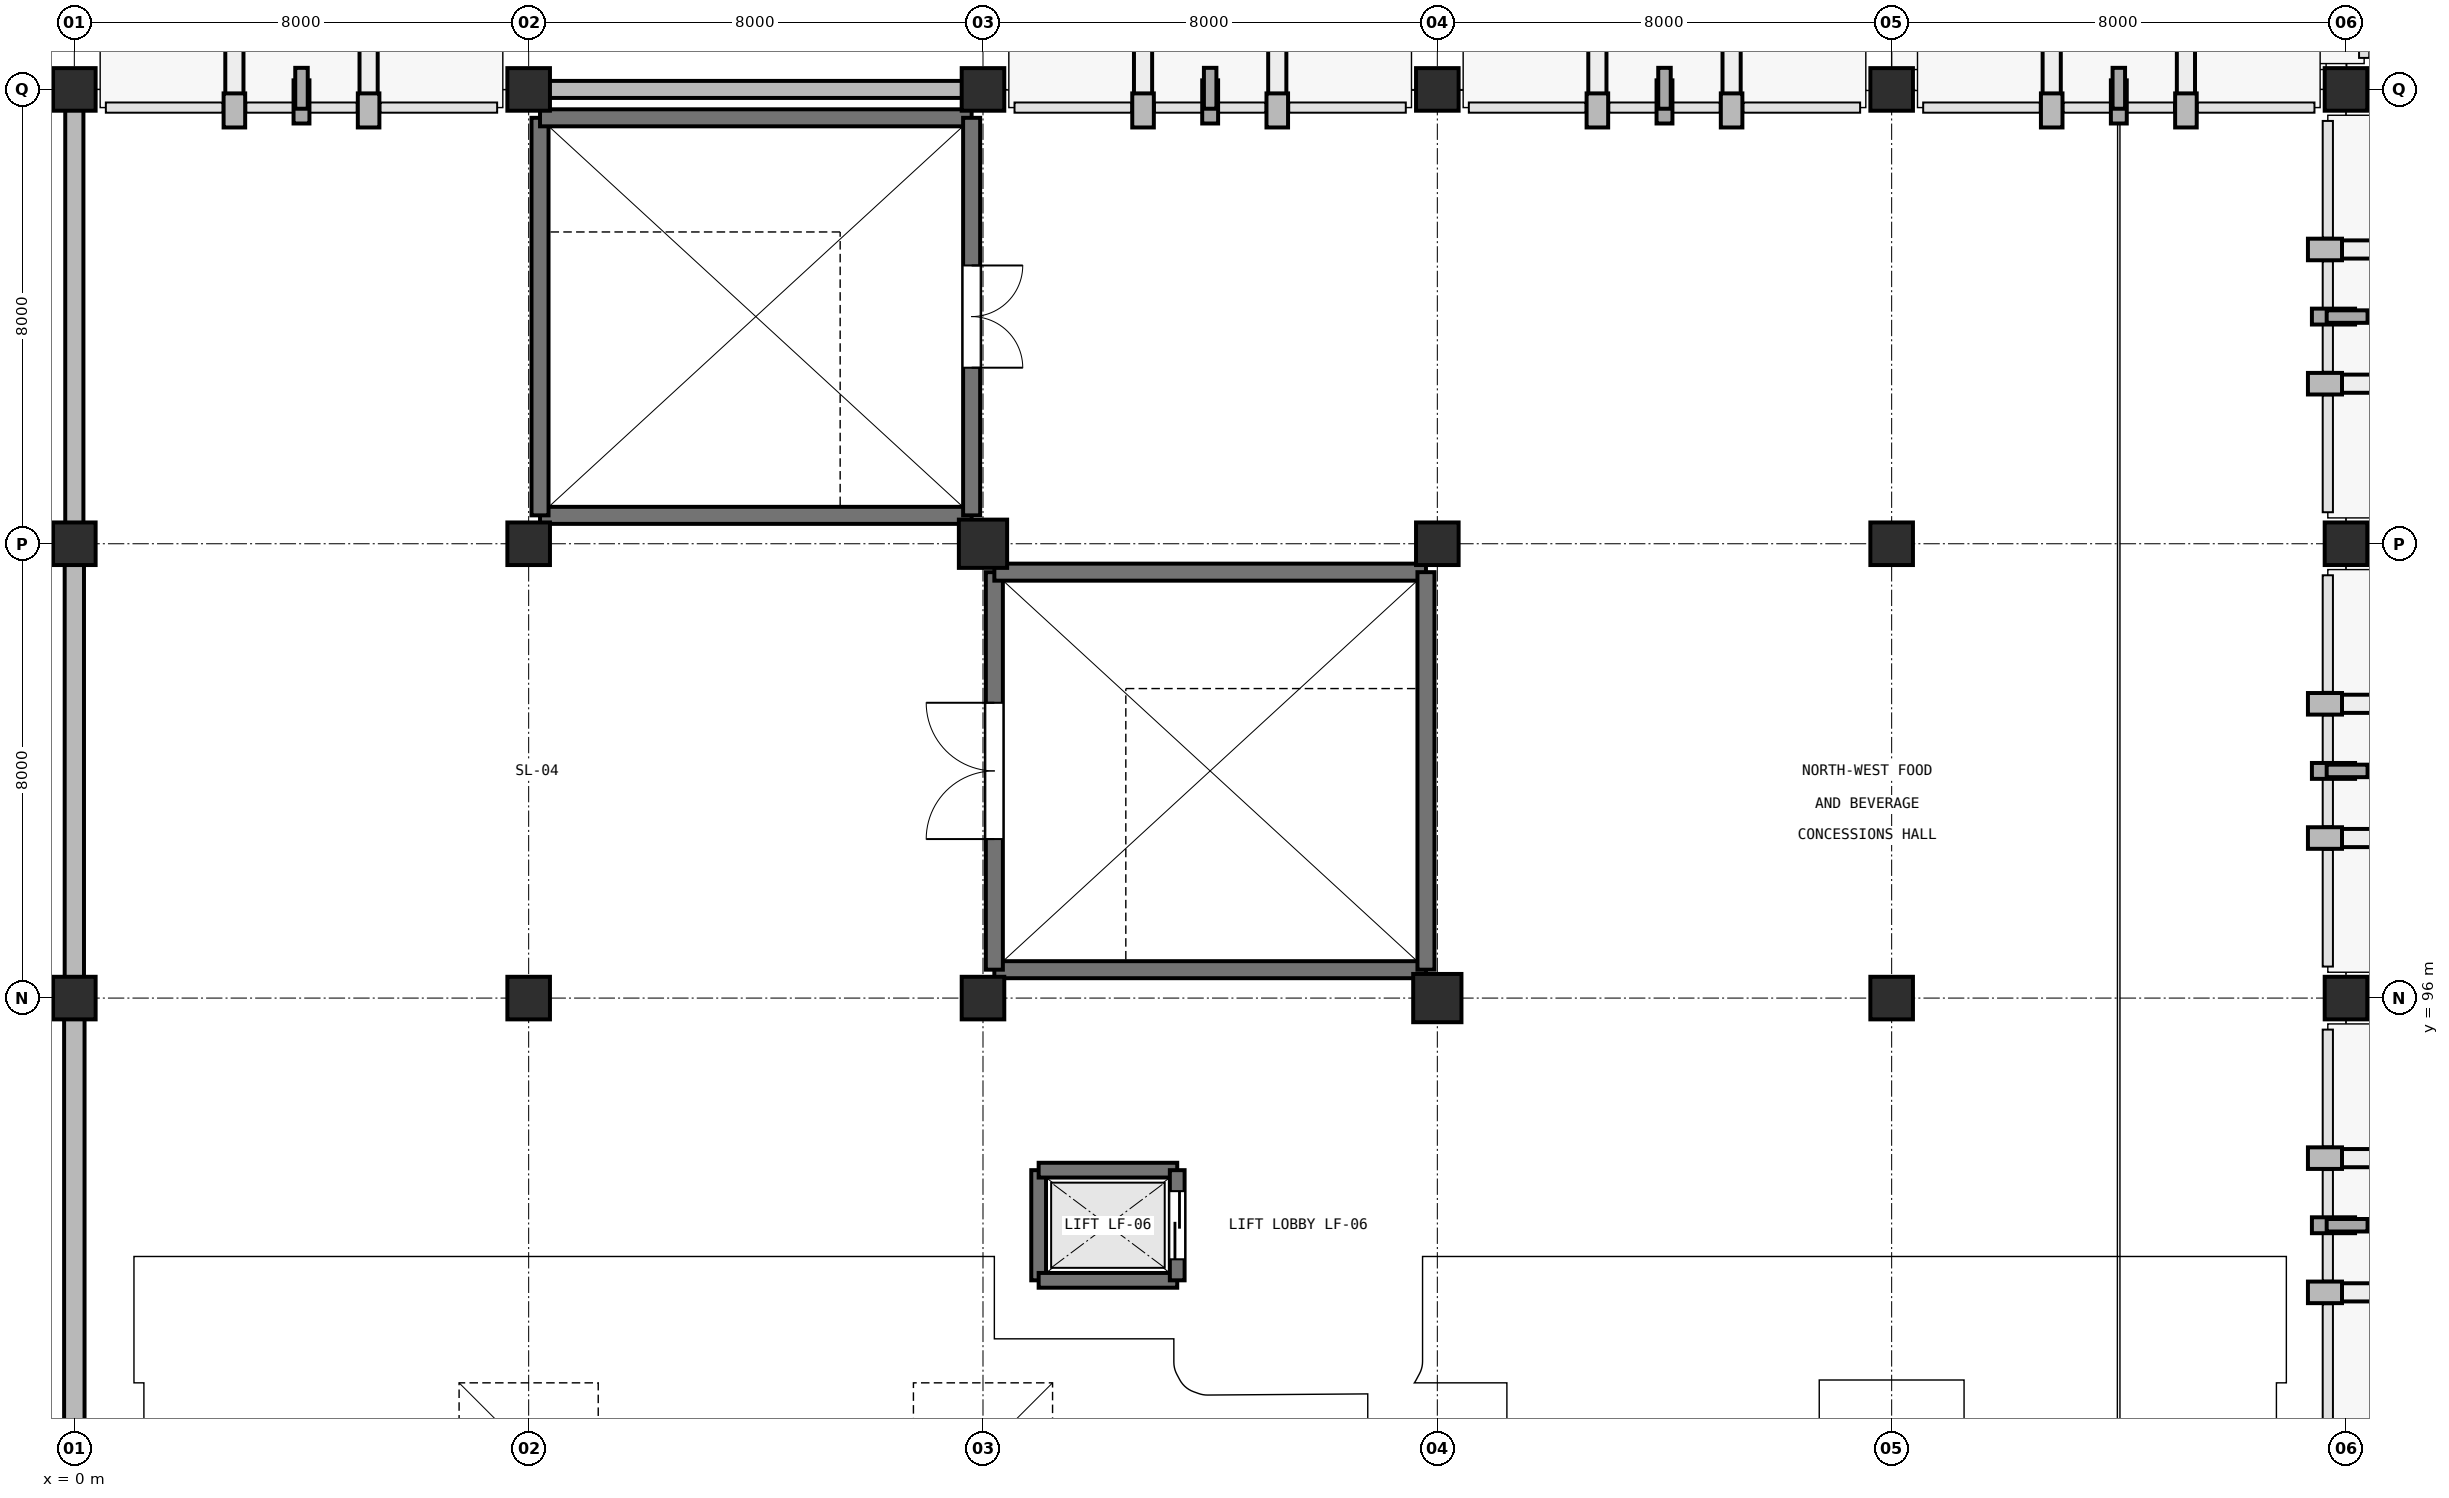
"""IFC4 building model, lengths in metres.
Left out: names, types, materials, properties, quantities, classifications, styles, units other than length and angle.
Written with IfcOpenShell. Run it as: python <this file> out.ifc"""

import sys

from ifc_helpers import new_model, si_unit, direction, frame, frame_2d, origin, origin_2d, place, context, subcontext, project, spatial, rectangle, extrude, element, fill, save


model = new_model("IFC4")
c1 = context("Model", 3, precision=1e-05, world=origin(), true_north=direction((0.0, 1.0)))
c2 = subcontext(c1, "Body", "Model", "MODEL_VIEW")
j1 = project(units=[si_unit("LENGTHUNIT", "METRE"), si_unit("PLANEANGLEUNIT", "RADIAN")], contexts=[c1])
p1 = place(None, origin())
s1 = spatial("IfcSite", under=j1, at=p1, CompositionType="ELEMENT")
p2 = place(p1, origin())
s2 = spatial("IfcBuilding", under=s1, at=p2, CompositionType="ELEMENT")
p3 = place(p2, frame((0.0, 0.0, 5.4)))
s3 = spatial("IfcBuildingStorey", under=s2, at=p3, CompositionType="ELEMENT", Elevation=5.4)
for number, where, z_axis, x_axis in (
    (1, (0.0, 96.0, 0.0), (0.0, 0.0, 1.0), (1.0, 0.0, 0.0)),
    (2, (0.0, 104.0, 0.0), (0.0, 0.0, 1.0), (1.0, 0.0, 0.0)),
    (3, (0.0, 112.0, 0.0), (0.0, 0.0, 1.0), (1.0, 0.0, 0.0)),
    (4, (8.0, 96.0, 0.0), (0.0, 0.0, 1.0), (1.0, 0.0, 0.0)),
    (5, (8.0, 104.0, 0.0), (0.0, 0.0, 1.0), (1.0, 0.0, 0.0)),
    (6, (8.0, 112.0, 0.0), (0.0, 0.0, 1.0), (1.0, 0.0, 0.0)),
    (7, (16.0, 96.0, 0.0), (0.0, 0.0, 1.0), (1.0, 0.0, 0.0)),
):
    element("IfcColumn", number, at=place(p3, frame(where, z_axis=z_axis, x_axis=x_axis)), inside=s3, PredefinedType="COLUMN", context=c2, shape_type="SweptSolid", body=[
        extrude(rectangle(XDim=0.75, YDim=0.75, at=origin_2d()), origin(), (0.0, 0.0, 1.0), 4.8),
    ])
p4 = place(p3, frame((16.0, 104.0, 0.0), z_axis=(0.0, 0.0, 1.0), x_axis=(1.0, 0.0, 0.0)))
e8 = element("IfcColumn", 8, at=p4, inside=s3, PredefinedType="COLUMN", context=c2, shape_type="SweptSolid", body=[
    extrude(rectangle(XDim=0.85, YDim=0.85, at=origin_2d()), origin(), (0.0, 0.0, 1.0), 4.8),
])
p5 = place(p3, frame((16.0, 112.0, 0.0), z_axis=(0.0, 0.0, 1.0), x_axis=(1.0, 0.0, 0.0)))
e9 = element("IfcColumn", 9, at=p5, inside=s3, PredefinedType="COLUMN", context=c2, shape_type="SweptSolid", body=[
    extrude(rectangle(XDim=0.75, YDim=0.75, at=origin_2d()), origin(), (0.0, 0.0, 1.0), 4.8),
])
p6 = place(p3, frame((24.0, 96.0, 0.0), z_axis=(0.0, 0.0, 1.0), x_axis=(1.0, 0.0, 0.0)))
e10 = element("IfcColumn", 10, at=p6, inside=s3, PredefinedType="COLUMN", context=c2, shape_type="SweptSolid", body=[
    extrude(rectangle(XDim=0.85, YDim=0.85, at=origin_2d()), origin(), (0.0, 0.0, 1.0), 4.8),
])
for number, where, z_axis, x_axis in (
    (11, (24.0, 104.0, 0.0), (0.0, 0.0, 1.0), (1.0, 0.0, 0.0)),
    (12, (24.0, 112.0, 0.0), (0.0, 0.0, 1.0), (1.0, 0.0, 0.0)),
    (13, (32.0, 96.0, 0.0), (0.0, 0.0, 1.0), (1.0, 0.0, 0.0)),
    (14, (32.0, 104.0, 0.0), (0.0, 0.0, 1.0), (1.0, 0.0, 0.0)),
    (15, (32.0, 112.0, 0.0), (0.0, 0.0, 1.0), (1.0, 0.0, 0.0)),
    (16, (40.0, 96.0, 0.0), (0.0, 0.0, 1.0), (1.0, 0.0, 0.0)),
    (17, (40.0, 104.0, 0.0), (0.0, 0.0, 1.0), (1.0, 0.0, 0.0)),
    (18, (40.0, 112.0, 0.0), (0.0, 0.0, 1.0), (1.0, 0.0, 0.0)),
):
    element("IfcColumn", number, at=place(p3, frame(where, z_axis=z_axis, x_axis=x_axis)), inside=s3, PredefinedType="COLUMN", context=c2, shape_type="SweptSolid", body=[
        extrude(rectangle(XDim=0.75, YDim=0.75, at=origin_2d()), origin(), (0.0, 0.0, 1.0), 4.8),
    ])
p7 = place(p3, frame((47.645, 112.0, 0.0), z_axis=(0.0, 0.0, 1.0), x_axis=(-1.0, 0.0, 0.0)))
e19 = element("IfcWall", 19, at=p7, inside=s3, PredefinedType="SOLIDWALL", context=c2, shape_type="SweptSolid", body=[
    extrude(rectangle(XDim=7.29, YDim=0.39, at=frame_2d((3.645, 0.0))), origin(), (0.0, 0.0, 1.0), 3.45),
])
for number, where, z_axis, x_axis in (
    (20, (39.33, 93.182, 0.0), (0.0, 0.0, 1.0), (1.0, 0.0, 0.0)),
    (21, (39.33, 90.818, 0.0), (0.0, 0.0, 1.0), (1.0, 0.0, 0.0)),
    (22, (39.33, 101.182, 0.0), (0.0, 0.0, 1.0), (1.0, 0.0, 0.0)),
    (23, (39.33, 98.818, 0.0), (0.0, 0.0, 1.0), (1.0, 0.0, 0.0)),
    (24, (39.33, 109.182, 0.0), (0.0, 0.0, 1.0), (1.0, 0.0, 0.0)),
    (25, (39.33, 106.818, 0.0), (0.0, 0.0, 1.0), (1.0, 0.0, 0.0)),
    (26, (34.818, 111.33, 0.0), (0.0, 0.0, 1.0), (0.0, 1.0, 0.0)),
    (27, (37.182, 111.33, 0.0), (0.0, 0.0, 1.0), (0.0, 1.0, 0.0)),
    (28, (26.818, 111.33, 0.0), (0.0, 0.0, 1.0), (0.0, 1.0, 0.0)),
    (29, (29.182, 111.33, 0.0), (0.0, 0.0, 1.0), (0.0, 1.0, 0.0)),
    (30, (18.818, 111.33, 0.0), (0.0, 0.0, 1.0), (0.0, 1.0, 0.0)),
    (31, (21.182, 111.33, 0.0), (0.0, 0.0, 1.0), (0.0, 1.0, 0.0)),
):
    element("IfcWall", number, at=place(p3, frame(where, z_axis=z_axis, x_axis=x_axis)), inside=s3, PredefinedType="SOLIDWALL", context=c2, shape_type="SweptSolid", body=[
        extrude(rectangle(XDim=0.6, YDim=0.38, at=frame_2d((0.3, 0.0))), origin(), (0.0, 0.0, 1.0), 3.6),
    ])
p8 = place(p3, frame((8.355, 112.0, 0.0), z_axis=(0.0, 0.0, 1.0), x_axis=(1.0, 0.0, 0.0)))
e32 = element("IfcWall", 32, at=p8, inside=s3, PredefinedType="SOLIDWALL", context=c2, shape_type="SweptSolid", body=[
    extrude(rectangle(XDim=7.29, YDim=0.3, at=frame_2d((3.645, 0.0))), origin(), (0.0, 0.0, 1.0), 3.6),
])
for number, where, z_axis, x_axis in (
    (33, (2.818, 111.33, 0.0), (0.0, 0.0, 1.0), (0.0, 1.0, 0.0)),
    (34, (5.182, 111.33, 0.0), (0.0, 0.0, 1.0), (0.0, 1.0, 0.0)),
):
    element("IfcWall", number, at=place(p3, frame(where, z_axis=z_axis, x_axis=x_axis)), inside=s3, PredefinedType="SOLIDWALL", context=c2, shape_type="SweptSolid", body=[
        extrude(rectangle(XDim=0.6, YDim=0.38, at=frame_2d((0.3, 0.0))), origin(), (0.0, 0.0, 1.0), 3.6),
    ])
p9 = place(p3, frame((0.0, 104.355, 0.0), z_axis=(0.0, 0.0, 1.0), x_axis=(0.0, 1.0, 0.0)))
e35 = element("IfcWall", 35, at=p9, inside=s3, PredefinedType="SOLIDWALL", context=c2, shape_type="SweptSolid", body=[
    extrude(rectangle(XDim=7.29, YDim=0.32, at=frame_2d((3.645, 0.0))), origin(), (0.0, 0.0, 1.0), 3.6),
])
p10 = place(p3, frame((0.0, 96.355, 0.0), z_axis=(0.0, 0.0, 1.0), x_axis=(0.0, 1.0, 0.0)))
e36 = element("IfcWall", 36, at=p10, inside=s3, PredefinedType="SOLIDWALL", context=c2, shape_type="SweptSolid", body=[
    extrude(rectangle(XDim=7.29, YDim=0.34, at=frame_2d((3.645, 0.0))), origin(), (0.0, 0.0, 1.0), 3.6),
])
p11 = place(p3, frame((0.0, 88.355, 0.0), z_axis=(0.0, 0.0, 1.0), x_axis=(0.0, 1.0, 0.0)))
e37 = element("IfcWall", 37, at=p11, inside=s3, PredefinedType="SOLIDWALL", context=c2, shape_type="SweptSolid", body=[
    extrude(rectangle(XDim=7.29, YDim=0.36, at=frame_2d((3.645, 0.0))), origin(), (0.0, 0.0, 1.0), 3.6),
])
p12 = place(p3, frame((23.8, 96.5, 0.0), z_axis=(0.0, 0.0, 1.0), x_axis=(-1.0, 0.0, 0.0)))
e38 = element("IfcWall", 38, at=p12, inside=s3, PredefinedType="SHEAR", context=c2, shape_type="SweptSolid", body=[
    extrude(rectangle(XDim=7.6, YDim=0.3, at=frame_2d((3.8, 0.0))), origin(), (0.0, 0.0, 1.0), 4.48),
])
p13 = place(p3, frame((16.2, 96.5, 0.0), z_axis=(0.0, 0.0, 1.0), x_axis=(0.0, 1.0, 0.0)))
e39 = element("IfcWall", 39, at=p13, inside=s3, PredefinedType="SHEAR", context=c2, shape_type="SweptSolid", body=[
    extrude(rectangle(XDim=7.0, YDim=0.3, at=frame_2d((3.5, 0.0))), origin(), (0.0, 0.0, 1.0), 4.48),
])
p14 = place(p13, frame((2.3, 0.0, 0.0)))
e40 = element("IfcOpeningElement", 40, at=p14, cuts=e39, PredefinedType="OPENING", context=c2, shape_type="SweptSolid", body=[
    extrude(rectangle(XDim=2.4, YDim=2.2, at=frame_2d((1.2, 1.1))), frame((0.0, 0.16, 0.0), z_axis=(0.0, -1.0, 0.0), x_axis=(1.0, 0.0, 0.0)), (0.0, 0.0, 1.0), 0.32),
])
p15 = place(p3, frame((16.2, 103.5, 0.0), z_axis=(0.0, 0.0, 1.0), x_axis=(1.0, 0.0, 0.0)))
e41 = element("IfcWall", 41, at=p15, inside=s3, PredefinedType="SHEAR", context=c2, shape_type="SweptSolid", body=[
    extrude(rectangle(XDim=7.6, YDim=0.3, at=frame_2d((3.8, 0.0))), origin(), (0.0, 0.0, 1.0), 4.48),
])
p16 = place(p3, frame((23.8, 103.5, 0.0), z_axis=(0.0, 0.0, 1.0), x_axis=(0.0, -1.0, 0.0)))
e42 = element("IfcWall", 42, at=p16, inside=s3, PredefinedType="SHEAR", context=c2, shape_type="SweptSolid", body=[
    extrude(rectangle(XDim=7.0, YDim=0.3, at=frame_2d((3.5, 0.0))), origin(), (0.0, 0.0, 1.0), 4.48),
])
p17 = place(p3, frame((15.8, 104.5, 0.0), z_axis=(0.0, 0.0, 1.0), x_axis=(-1.0, 0.0, 0.0)))
e43 = element("IfcWall", 43, at=p17, inside=s3, PredefinedType="SHEAR", context=c2, shape_type="SweptSolid", body=[
    extrude(rectangle(XDim=7.6, YDim=0.3, at=frame_2d((3.8, 0.0))), origin(), (0.0, 0.0, 1.0), 4.48),
])
p18 = place(p3, frame((8.2, 104.5, 0.0), z_axis=(0.0, 0.0, 1.0), x_axis=(0.0, 1.0, 0.0)))
e44 = element("IfcWall", 44, at=p18, inside=s3, PredefinedType="SHEAR", context=c2, shape_type="SweptSolid", body=[
    extrude(rectangle(XDim=7.0, YDim=0.3, at=frame_2d((3.5, 0.0))), origin(), (0.0, 0.0, 1.0), 4.48),
])
p19 = place(p3, frame((8.2, 111.5, 0.0), z_axis=(0.0, 0.0, 1.0), x_axis=(1.0, 0.0, 0.0)))
e45 = element("IfcWall", 45, at=p19, inside=s3, PredefinedType="SHEAR", context=c2, shape_type="SweptSolid", body=[
    extrude(rectangle(XDim=7.6, YDim=0.3, at=frame_2d((3.8, 0.0))), origin(), (0.0, 0.0, 1.0), 4.48),
])
p20 = place(p3, frame((15.8, 111.5, 0.0), z_axis=(0.0, 0.0, 1.0), x_axis=(0.0, -1.0, 0.0)))
e46 = element("IfcWall", 46, at=p20, inside=s3, PredefinedType="SHEAR", context=c2, shape_type="SweptSolid", body=[
    extrude(rectangle(XDim=7.0, YDim=0.3, at=frame_2d((3.5, 0.0))), origin(), (0.0, 0.0, 1.0), 4.48),
])
p21 = place(p20, frame((2.6, 0.0, 0.0)))
e47 = element("IfcOpeningElement", 47, at=p21, cuts=e46, PredefinedType="OPENING", context=c2, shape_type="SweptSolid", body=[
    extrude(rectangle(XDim=1.8, YDim=2.2, at=frame_2d((0.9, 1.1))), frame((0.0, 0.16, 0.0), z_axis=(0.0, -1.0, 0.0), x_axis=(1.0, 0.0, 0.0)), (0.0, 0.0, 1.0), 0.32),
])
p22 = place(p3, frame((16.98, 91.03, 0.0), z_axis=(0.0, 0.0, 1.0), x_axis=(0.0, 1.0, 0.0)))
e48 = element("IfcWall", 48, at=p22, inside=s3, PredefinedType="SHEAR", context=c2, shape_type="SweptSolid", body=[
    extrude(rectangle(XDim=1.94, YDim=0.26, at=frame_2d((0.97, 0.0))), origin(), (0.0, 0.0, 1.0), 4.48),
])
for number, where, z_axis, x_axis in (
    (49, (16.98, 92.97, 0.0), (0.0, 0.0, 1.0), (1.0, 0.0, 0.0)),
    (50, (19.42, 91.03, 0.0), (0.0, 0.0, 1.0), (-1.0, 0.0, 0.0)),
):
    element("IfcWall", number, at=place(p3, frame(where, z_axis=z_axis, x_axis=x_axis)), inside=s3, PredefinedType="SHEAR", context=c2, shape_type="SweptSolid", body=[
        extrude(rectangle(XDim=2.44, YDim=0.26, at=frame_2d((1.22, 0.0))), origin(), (0.0, 0.0, 1.0), 4.48),
    ])
p23 = place(p3, frame((19.42, 92.97, 0.0), z_axis=(0.0, 0.0, 1.0), x_axis=(0.0, -1.0, 0.0)))
e51 = element("IfcWall", 51, at=p23, inside=s3, PredefinedType="SHEAR", context=c2, shape_type="SweptSolid", body=[
    extrude(rectangle(XDim=1.94, YDim=0.26, at=frame_2d((0.97, 0.0))), origin(), (0.0, 0.0, 1.0), 4.48),
])
p24 = place(p23, frame((0.37, 0.0, 0.0)))
e52 = element("IfcOpeningElement", 52, at=p24, cuts=e51, PredefinedType="OPENING", context=c2, shape_type="SweptSolid", body=[
    extrude(rectangle(XDim=1.2, YDim=2.15, at=frame_2d((0.6, 1.075))), frame((0.0, 0.14, 0.0), z_axis=(0.0, -1.0, 0.0), x_axis=(1.0, 0.0, 0.0)), (0.0, 0.0, 1.0), 0.28),
])
p25 = place(p14, frame((2.4, 0.0, 0.0), z_axis=(0.0, 0.0, 1.0), x_axis=(-1.0, 0.0, 0.0)))
e53 = element("IfcDoor", 53, at=p25, inside=s3, OperationType="DOUBLE_DOOR_SINGLE_SWING", PredefinedType="DOOR", context=c2, shape_type="SweptSolid", body=[
    extrude(rectangle(XDim=2.4, YDim=2.2, at=frame_2d((1.2, 1.1))), frame((0.0, 0.025, 0.0), z_axis=(0.0, -1.0, 0.0), x_axis=(1.0, 0.0, 0.0)), (0.0, 0.0, 1.0), 0.05),
])
fill(e40, e53)
p26 = place(p21, frame((1.8, 0.0, 0.0), z_axis=(0.0, 0.0, 1.0), x_axis=(-1.0, 0.0, 0.0)))
e54 = element("IfcDoor", 54, at=p26, inside=s3, OperationType="DOUBLE_DOOR_SINGLE_SWING", PredefinedType="DOOR", context=c2, shape_type="SweptSolid", body=[
    extrude(rectangle(XDim=1.8, YDim=2.2, at=frame_2d((0.9, 1.1))), frame((0.0, 0.025, 0.0), z_axis=(0.0, -1.0, 0.0), x_axis=(1.0, 0.0, 0.0)), (0.0, 0.0, 1.0), 0.05),
])
fill(e47, e54)
p27 = place(p24, origin())
e55 = element("IfcDoor", 55, at=p27, inside=s3, OperationType="SLIDING_TO_LEFT", PredefinedType="DOOR", context=c2, shape_type="SweptSolid", body=[
    extrude(rectangle(XDim=1.2, YDim=2.15, at=frame_2d((0.6, 1.075))), frame((0.0, 0.025, 0.0), z_axis=(0.0, -1.0, 0.0), x_axis=(1.0, 0.0, 0.0)), (0.0, 0.0, 1.0), 0.05),
])
fill(e52, e55)
save(model, sys.argv[1])
